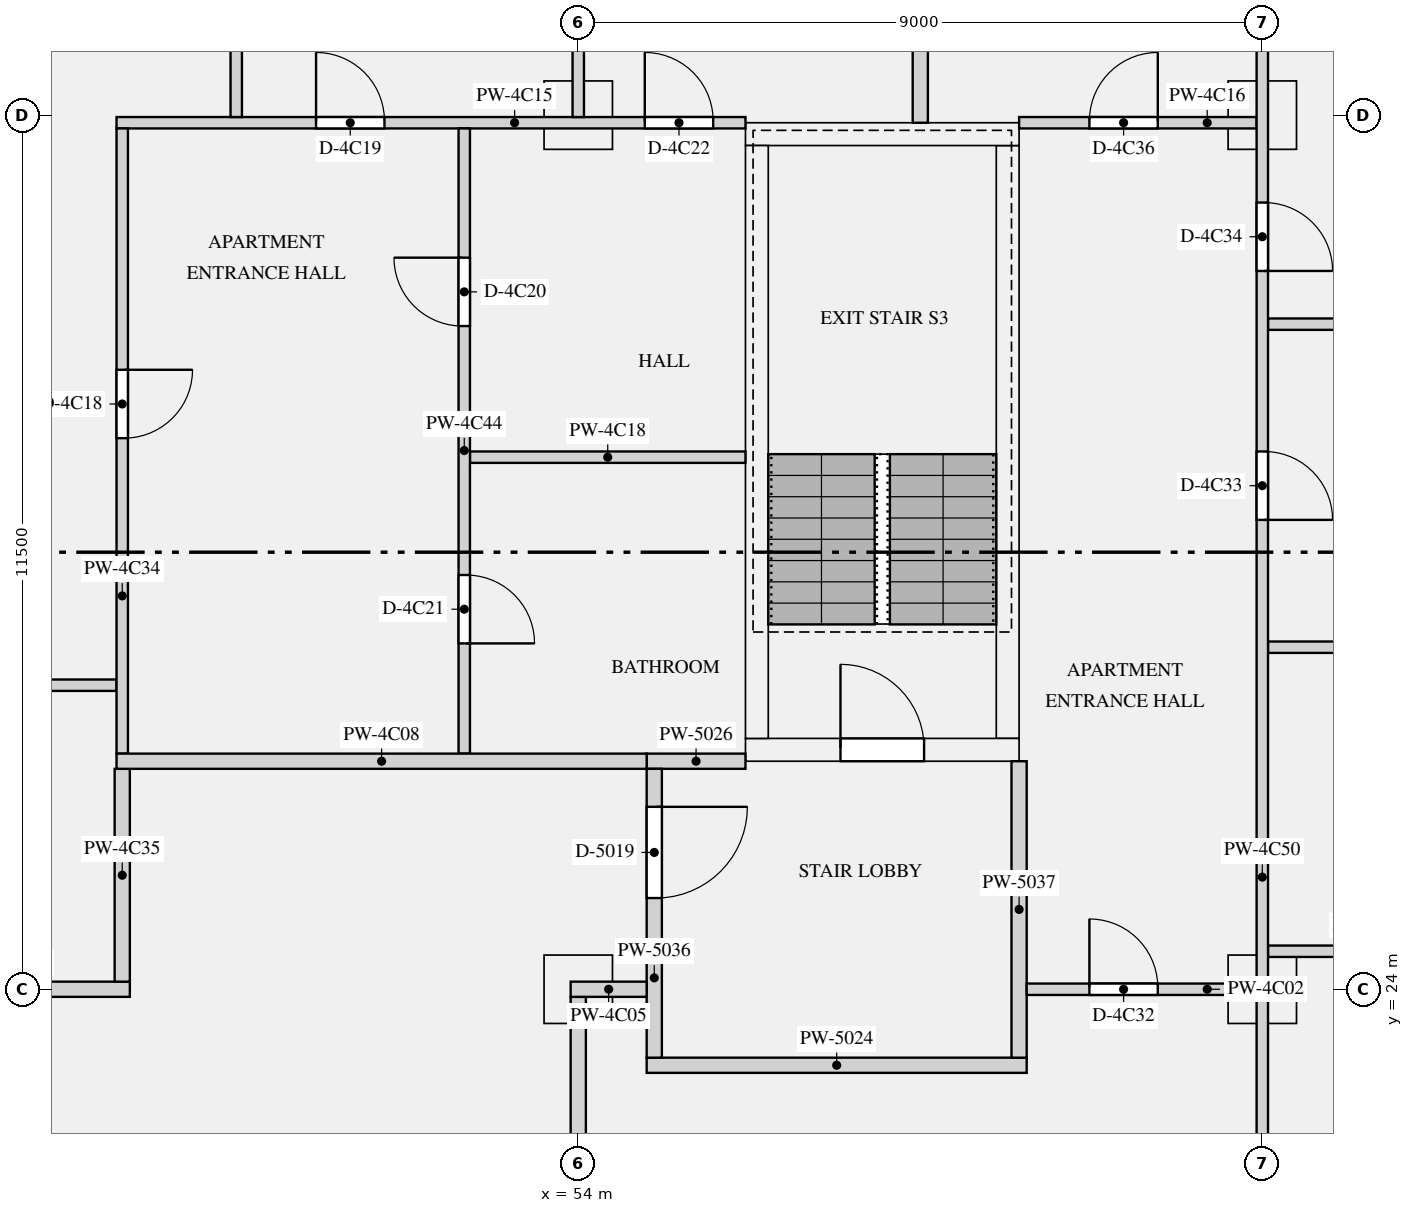
"""IFC4 building model, lengths in metres.
Left out: names, types, materials, properties, quantities, classifications, styles, units other than length and angle.
Written with IfcOpenShell. Run it as: python <this file> out.ifc"""

import sys

from ifc_helpers import new_model, si_unit, direction, frame, frame_2d, origin, origin_2d, place, context, subcontext, project, spatial, rectangle, extrude, element, fill, save


model = new_model("IFC4")
c1 = context("Model", 3, precision=1e-05, world=origin(), true_north=direction((0.0, 1.0)))
c2 = subcontext(c1, "Body", "Model", "MODEL_VIEW")
j1 = project(units=[si_unit("LENGTHUNIT", "METRE"), si_unit("PLANEANGLEUNIT", "RADIAN")], contexts=[c1])
p1 = place(None, origin())
s1 = spatial("IfcSite", under=j1, at=p1, CompositionType="ELEMENT")
p2 = place(p1, origin())
s2 = spatial("IfcBuilding", under=s1, at=p2, CompositionType="ELEMENT")
p3 = place(p2, frame((0.0, 0.0, 216.9)))
s3 = spatial("IfcBuildingStorey", under=s2, at=p3, CompositionType="ELEMENT", Elevation=216.9)
for number, where, z_axis, x_axis in (
    (1, (54.0, 24.0, 0.0), (0.0, 0.0, 1.0), (1.0, 0.0, 0.0)),
    (2, (63.0, 24.0, 0.0), (0.0, 0.0, 1.0), (1.0, 0.0, 0.0)),
    (3, (54.0, 35.5, 0.0), (0.0, 0.0, 1.0), (1.0, 0.0, 0.0)),
    (4, (63.0, 35.5, 0.0), (0.0, 0.0, 1.0), (1.0, 0.0, 0.0)),
):
    element("IfcColumn", number, at=place(p3, frame(where, z_axis=z_axis, x_axis=x_axis)), inside=s3, PredefinedType="COLUMN", context=c2, shape_type="SweptSolid", body=[
        extrude(rectangle(XDim=0.9, YDim=0.9, at=origin_2d()), origin(), (0.0, 0.0, 1.0), 3.15),
    ])
p4 = place(p3, frame((56.2, 27.15, 0.0), z_axis=(0.0, 0.0, 1.0), x_axis=(1.0, 0.0, 0.0)))
e5 = element("IfcWall", 5, at=p4, inside=s3, PredefinedType="SHEAR", context=c2, shape_type="SweptSolid", body=[
    extrude(rectangle(XDim=3.6, YDim=0.3, at=frame_2d((1.8, 0.0))), origin(), (0.0, 0.0, 1.0), 3.15),
])
p5 = place(p4, frame((1.25, 0.0, 0.0)))
e6 = element("IfcOpeningElement", 6, at=p5, cuts=e5, PredefinedType="OPENING", context=c2, shape_type="SweptSolid", body=[
    extrude(rectangle(XDim=1.1, YDim=2.1, at=frame_2d((0.55, 1.05))), frame((0.0, 0.16, 0.0), z_axis=(0.0, -1.0, 0.0), x_axis=(1.0, 0.0, 0.0)), (0.0, 0.0, 1.0), 0.32),
])
p6 = place(p3, frame((56.2, 35.25, 0.0), z_axis=(0.0, 0.0, 1.0), x_axis=(1.0, 0.0, 0.0)))
e7 = element("IfcWall", 7, at=p6, inside=s3, PredefinedType="SHEAR", context=c2, shape_type="SweptSolid", body=[
    extrude(rectangle(XDim=3.6, YDim=0.3, at=frame_2d((1.8, 0.0))), origin(), (0.0, 0.0, 1.0), 3.15),
])
for number, where, z_axis, x_axis in (
    (8, (56.35, 27.3, 0.0), (0.0, 0.0, 1.0), (0.0, 1.0, 0.0)),
    (9, (59.65, 27.3, 0.0), (0.0, 0.0, 1.0), (0.0, 1.0, 0.0)),
):
    element("IfcWall", number, at=place(p3, frame(where, z_axis=z_axis, x_axis=x_axis)), inside=s3, PredefinedType="SHEAR", context=c2, shape_type="SweptSolid", body=[
        extrude(rectangle(XDim=7.8, YDim=0.3, at=frame_2d((3.9, 0.0))), origin(), (0.0, 0.0, 1.0), 3.15),
    ])
p7 = place(p3, frame((54.9, 23.0, 0.0), z_axis=(0.0, 0.0, 1.0), x_axis=(1.0, 0.0, 0.0)))
e10 = element("IfcWall", 10, at=p7, inside=s3, PredefinedType="PARTITIONING", context=c2, shape_type="SweptSolid", body=[
    extrude(rectangle(XDim=5.0, YDim=0.2, at=frame_2d((2.5, 0.0))), origin(), (0.0, 0.0, 1.0), 2.83),
])
p8 = place(p3, frame((54.9, 27.0, 0.0), z_axis=(0.0, 0.0, 1.0), x_axis=(1.0, 0.0, 0.0)))
e11 = element("IfcWall", 11, at=p8, inside=s3, PredefinedType="PARTITIONING", context=c2, shape_type="SweptSolid", body=[
    extrude(rectangle(XDim=1.3, YDim=0.2, at=frame_2d((0.65, 0.0))), origin(), (0.0, 0.0, 1.0), 2.83),
])
p9 = place(p3, frame((55.0, 23.1, 0.0), z_axis=(0.0, 0.0, 1.0), x_axis=(0.0, 1.0, 0.0)))
e12 = element("IfcWall", 12, at=p9, inside=s3, PredefinedType="PARTITIONING", context=c2, shape_type="SweptSolid", body=[
    extrude(rectangle(XDim=3.8, YDim=0.2, at=frame_2d((1.9, 0.0))), origin(), (0.0, 0.0, 1.0), 2.83),
])
p10 = place(p9, frame((2.1, 0.0, 0.0)))
e13 = element("IfcOpeningElement", 13, at=p10, cuts=e12, PredefinedType="OPENING", context=c2, shape_type="SweptSolid", body=[
    extrude(rectangle(XDim=1.2, YDim=2.1, at=frame_2d((0.6, 1.05))), frame((0.0, 0.11, 0.0), z_axis=(0.0, -1.0, 0.0), x_axis=(1.0, 0.0, 0.0)), (0.0, 0.0, 1.0), 0.22),
])
p11 = place(p3, frame((59.8, 23.1, 0.0), z_axis=(0.0, 0.0, 1.0), x_axis=(0.0, 1.0, 0.0)))
e14 = element("IfcWall", 14, at=p11, inside=s3, PredefinedType="PARTITIONING", context=c2, shape_type="SweptSolid", body=[
    extrude(rectangle(XDim=3.9, YDim=0.2, at=frame_2d((1.95, 0.0))), origin(), (0.0, 0.0, 1.0), 2.83),
])
p12 = place(p3, frame((59.9, 24.0, 0.0), z_axis=(0.0, 0.0, 1.0), x_axis=(1.0, 0.0, 0.0)))
e15 = element("IfcWall", 15, at=p12, inside=s3, PredefinedType="PARTITIONING", context=c2, shape_type="SweptSolid", body=[
    extrude(rectangle(XDim=3.025, YDim=0.15, at=frame_2d((1.513, 0.0))), origin(), (0.0, 0.0, 1.0), 2.83),
])
p13 = place(p12, frame((0.825, 0.0, 0.0)))
e16 = element("IfcOpeningElement", 16, at=p13, cuts=e15, PredefinedType="OPENING", context=c2, shape_type="SweptSolid", body=[
    extrude(rectangle(XDim=0.9, YDim=2.1, at=frame_2d((0.45, 1.05))), frame((0.0, 0.085, 0.0), z_axis=(0.0, -1.0, 0.0), x_axis=(1.0, 0.0, 0.0)), (0.0, 0.0, 1.0), 0.17),
])
p14 = place(p3, frame((45.0, 24.0, 0.0), z_axis=(0.0, 0.0, 1.0), x_axis=(1.0, 0.0, 0.0)))
e17 = element("IfcWall", 17, at=p14, inside=s3, PredefinedType="PARTITIONING", context=c2, shape_type="SweptSolid", body=[
    extrude(rectangle(XDim=3.1, YDim=0.2, at=frame_2d((1.55, 0.0))), origin(), (0.0, 0.0, 1.0), 2.83),
])
p15 = place(p3, frame((53.9, 24.0, 0.0), z_axis=(0.0, 0.0, 1.0), x_axis=(1.0, 0.0, 0.0)))
e18 = element("IfcWall", 18, at=p15, inside=s3, PredefinedType="PARTITIONING", context=c2, shape_type="SweptSolid", body=[
    extrude(rectangle(XDim=1.0, YDim=0.2, at=frame_2d((0.5, 0.0))), origin(), (0.0, 0.0, 1.0), 2.83),
])
p16 = place(p3, frame((47.925, 27.0, 0.0), z_axis=(0.0, 0.0, 1.0), x_axis=(1.0, 0.0, 0.0)))
e19 = element("IfcWall", 19, at=p16, inside=s3, PredefinedType="PARTITIONING", context=c2, shape_type="SweptSolid", body=[
    extrude(rectangle(XDim=6.975, YDim=0.2, at=frame_2d((3.487, 0.0))), origin(), (0.0, 0.0, 1.0), 2.83),
])
p17 = place(p3, frame((47.925, 35.4, 0.0), z_axis=(0.0, 0.0, 1.0), x_axis=(1.0, 0.0, 0.0)))
e20 = element("IfcWall", 20, at=p17, inside=s3, PredefinedType="PARTITIONING", context=c2, shape_type="SweptSolid", body=[
    extrude(rectangle(XDim=8.275, YDim=0.15, at=frame_2d((4.137, 0.0))), origin(), (0.0, 0.0, 1.0), 2.83),
])
p18 = place(p17, frame((2.625, 0.0, 0.0)))
e21 = element("IfcOpeningElement", 21, at=p18, cuts=e20, PredefinedType="OPENING", context=c2, shape_type="SweptSolid", body=[
    extrude(rectangle(XDim=0.9, YDim=2.1, at=frame_2d((0.45, 1.05))), frame((0.0, 0.085, 0.0), z_axis=(0.0, -1.0, 0.0), x_axis=(1.0, 0.0, 0.0)), (0.0, 0.0, 1.0), 0.17),
])
p19 = place(p17, frame((6.95, 0.0, 0.0)))
e22 = element("IfcOpeningElement", 22, at=p19, cuts=e20, PredefinedType="OPENING", context=c2, shape_type="SweptSolid", body=[
    extrude(rectangle(XDim=0.9, YDim=2.1, at=frame_2d((0.45, 1.05))), frame((0.0, 0.085, 0.0), z_axis=(0.0, -1.0, 0.0), x_axis=(1.0, 0.0, 0.0)), (0.0, 0.0, 1.0), 0.17),
])
p20 = place(p3, frame((59.8, 35.4, 0.0), z_axis=(0.0, 0.0, 1.0), x_axis=(1.0, 0.0, 0.0)))
e23 = element("IfcWall", 23, at=p20, inside=s3, PredefinedType="PARTITIONING", context=c2, shape_type="SweptSolid", body=[
    extrude(rectangle(XDim=3.125, YDim=0.15, at=frame_2d((1.562, 0.0))), origin(), (0.0, 0.0, 1.0), 2.83),
])
p21 = place(p20, frame((0.925, 0.0, 0.0)))
e24 = element("IfcOpeningElement", 24, at=p21, cuts=e23, PredefinedType="OPENING", context=c2, shape_type="SweptSolid", body=[
    extrude(rectangle(XDim=0.9, YDim=2.1, at=frame_2d((0.45, 1.05))), frame((0.0, 0.085, 0.0), z_axis=(0.0, -1.0, 0.0), x_axis=(1.0, 0.0, 0.0)), (0.0, 0.0, 1.0), 0.17),
])
p22 = place(p3, frame((52.575, 31.0, 0.0), z_axis=(0.0, 0.0, 1.0), x_axis=(1.0, 0.0, 0.0)))
e25 = element("IfcWall", 25, at=p22, inside=s3, PredefinedType="PARTITIONING", context=c2, shape_type="SweptSolid", body=[
    extrude(rectangle(XDim=3.625, YDim=0.15, at=frame_2d((1.812, 0.0))), origin(), (0.0, 0.0, 1.0), 2.83),
])
p23 = place(p3, frame((63.075, 32.75, 0.0), z_axis=(0.0, 0.0, 1.0), x_axis=(1.0, 0.0, 0.0)))
e26 = element("IfcWall", 26, at=p23, inside=s3, PredefinedType="PARTITIONING", context=c2, shape_type="SweptSolid", body=[
    extrude(rectangle(XDim=8.275, YDim=0.15, at=frame_2d((4.138, 0.0))), origin(), (0.0, 0.0, 1.0), 2.83),
])
p24 = place(p3, frame((45.0, 28.0, 0.0), z_axis=(0.0, 0.0, 1.0), x_axis=(1.0, 0.0, 0.0)))
e27 = element("IfcWall", 27, at=p24, inside=s3, PredefinedType="PARTITIONING", context=c2, shape_type="SweptSolid", body=[
    extrude(rectangle(XDim=2.925, YDim=0.15, at=frame_2d((1.462, 0.0))), origin(), (0.0, 0.0, 1.0), 2.83),
])
p25 = place(p24, frame((1.05, 0.0, 0.0)))
e28 = element("IfcOpeningElement", 28, at=p25, cuts=e27, PredefinedType="OPENING", context=c2, shape_type="SweptSolid", body=[
    extrude(rectangle(XDim=0.9, YDim=2.1, at=frame_2d((0.45, 1.05))), frame((0.0, 0.085, 0.0), z_axis=(0.0, -1.0, 0.0), x_axis=(1.0, 0.0, 0.0)), (0.0, 0.0, 1.0), 0.17),
])
p26 = place(p3, frame((63.075, 24.5, 0.0), z_axis=(0.0, 0.0, 1.0), x_axis=(1.0, 0.0, 0.0)))
e29 = element("IfcWall", 29, at=p26, inside=s3, PredefinedType="PARTITIONING", context=c2, shape_type="SweptSolid", body=[
    extrude(rectangle(XDim=5.775, YDim=0.15, at=frame_2d((2.888, 0.0))), origin(), (0.0, 0.0, 1.0), 2.83),
])
p27 = place(p26, frame((2.7, 0.0, 0.0)))
e30 = element("IfcOpeningElement", 30, at=p27, cuts=e29, PredefinedType="OPENING", context=c2, shape_type="SweptSolid", body=[
    extrude(rectangle(XDim=0.9, YDim=2.1, at=frame_2d((0.45, 1.05))), frame((0.0, 0.085, 0.0), z_axis=(0.0, -1.0, 0.0), x_axis=(1.0, 0.0, 0.0)), (0.0, 0.0, 1.0), 0.17),
])
p28 = place(p3, frame((63.075, 28.5, 0.0), z_axis=(0.0, 0.0, 1.0), x_axis=(1.0, 0.0, 0.0)))
e31 = element("IfcWall", 31, at=p28, inside=s3, PredefinedType="PARTITIONING", context=c2, shape_type="SweptSolid", body=[
    extrude(rectangle(XDim=5.775, YDim=0.15, at=frame_2d((2.888, 0.0))), origin(), (0.0, 0.0, 1.0), 2.83),
])
p29 = place(p3, frame((54.0, 35.475, 0.0), z_axis=(0.0, 0.0, 1.0), x_axis=(0.0, 1.0, 0.0)))
e32 = element("IfcWall", 32, at=p29, inside=s3, PredefinedType="PARTITIONING", context=c2, shape_type="SweptSolid", body=[
    extrude(rectangle(XDim=5.375, YDim=0.15, at=frame_2d((2.688, 0.0))), origin(), (0.0, 0.0, 1.0), 2.83),
])
p30 = place(p3, frame((54.0, 16.1, 0.0), z_axis=(0.0, 0.0, 1.0), x_axis=(0.0, 1.0, 0.0)))
e33 = element("IfcWall", 33, at=p30, inside=s3, PredefinedType="PARTITIONING", context=c2, shape_type="SweptSolid", body=[
    extrude(rectangle(XDim=7.8, YDim=0.2, at=frame_2d((3.9, 0.0))), origin(), (0.0, 0.0, 1.0), 2.83),
])
p31 = place(p30, frame((1.85, 0.0, 0.0)))
e34 = element("IfcOpeningElement", 34, at=p31, cuts=e33, PredefinedType="OPENING", context=c2, shape_type="SweptSolid", body=[
    extrude(rectangle(XDim=1.1, YDim=2.1, at=frame_2d((0.55, 1.05))), frame((0.0, 0.11, 0.0), z_axis=(0.0, -1.0, 0.0), x_axis=(1.0, 0.0, 0.0)), (0.0, 0.0, 1.0), 0.22),
])
p32 = place(p3, frame((48.0, 27.1, 0.0), z_axis=(0.0, 0.0, 1.0), x_axis=(0.0, 1.0, 0.0)))
e35 = element("IfcWall", 35, at=p32, inside=s3, PredefinedType="PARTITIONING", context=c2, shape_type="SweptSolid", body=[
    extrude(rectangle(XDim=8.225, YDim=0.15, at=frame_2d((4.112, 0.0))), origin(), (0.0, 0.0, 1.0), 2.83),
])
p33 = place(p32, frame((4.15, 0.0, 0.0)))
e36 = element("IfcOpeningElement", 36, at=p33, cuts=e35, PredefinedType="OPENING", context=c2, shape_type="SweptSolid", body=[
    extrude(rectangle(XDim=0.9, YDim=2.1, at=frame_2d((0.45, 1.05))), frame((0.0, 0.085, 0.0), z_axis=(0.0, -1.0, 0.0), x_axis=(1.0, 0.0, 0.0)), (0.0, 0.0, 1.0), 0.17),
])
p34 = place(p3, frame((48.0, 24.1, 0.0), z_axis=(0.0, 0.0, 1.0), x_axis=(0.0, 1.0, 0.0)))
e37 = element("IfcWall", 37, at=p34, inside=s3, PredefinedType="PARTITIONING", context=c2, shape_type="SweptSolid", body=[
    extrude(rectangle(XDim=2.8, YDim=0.2, at=frame_2d((1.4, 0.0))), origin(), (0.0, 0.0, 1.0), 2.83),
])
p35 = place(p3, frame((49.5, 35.475, 0.0), z_axis=(0.0, 0.0, 1.0), x_axis=(0.0, 1.0, 0.0)))
e38 = element("IfcWall", 38, at=p35, inside=s3, PredefinedType="PARTITIONING", context=c2, shape_type="SweptSolid", body=[
    extrude(rectangle(XDim=5.375, YDim=0.15, at=frame_2d((2.688, 0.0))), origin(), (0.0, 0.0, 1.0), 2.83),
])
p36 = place(p3, frame((52.5, 27.1, 0.0), z_axis=(0.0, 0.0, 1.0), x_axis=(0.0, 1.0, 0.0)))
e39 = element("IfcWall", 39, at=p36, inside=s3, PredefinedType="PARTITIONING", context=c2, shape_type="SweptSolid", body=[
    extrude(rectangle(XDim=8.225, YDim=0.15, at=frame_2d((4.112, 0.0))), origin(), (0.0, 0.0, 1.0), 2.83),
])
p37 = place(p36, frame((5.625, 0.0, 0.0)))
e40 = element("IfcOpeningElement", 40, at=p37, cuts=e39, PredefinedType="OPENING", context=c2, shape_type="SweptSolid", body=[
    extrude(rectangle(XDim=0.9, YDim=2.1, at=frame_2d((0.45, 1.05))), frame((0.0, 0.085, 0.0), z_axis=(0.0, -1.0, 0.0), x_axis=(1.0, 0.0, 0.0)), (0.0, 0.0, 1.0), 0.17),
])
p38 = place(p36, frame((1.45, 0.0, 0.0)))
e41 = element("IfcOpeningElement", 41, at=p38, cuts=e39, PredefinedType="OPENING", context=c2, shape_type="SweptSolid", body=[
    extrude(rectangle(XDim=0.9, YDim=2.1, at=frame_2d((0.45, 1.05))), frame((0.0, 0.085, 0.0), z_axis=(0.0, -1.0, 0.0), x_axis=(1.0, 0.0, 0.0)), (0.0, 0.0, 1.0), 0.17),
])
p39 = place(p3, frame((58.5, 35.4, 0.0), z_axis=(0.0, 0.0, 1.0), x_axis=(0.0, 1.0, 0.0)))
e42 = element("IfcWall", 42, at=p39, inside=s3, PredefinedType="PARTITIONING", context=c2, shape_type="SweptSolid", body=[
    extrude(rectangle(XDim=5.45, YDim=0.2, at=frame_2d((2.725, 0.0))), origin(), (0.0, 0.0, 1.0), 2.83),
])
p40 = place(p3, frame((63.0, 16.575, 0.0), z_axis=(0.0, 0.0, 1.0), x_axis=(0.0, 1.0, 0.0)))
e43 = element("IfcWall", 43, at=p40, inside=s3, PredefinedType="PARTITIONING", context=c2, shape_type="SweptSolid", body=[
    extrude(rectangle(XDim=24.275, YDim=0.15, at=frame_2d((12.138, 0.0))), origin(), (0.0, 0.0, 1.0), 2.83),
])
p41 = place(p40, frame((2.7, 0.0, 0.0)))
e44 = element("IfcOpeningElement", 44, at=p41, cuts=e43, PredefinedType="OPENING", context=c2, shape_type="SweptSolid", body=[
    extrude(rectangle(XDim=1.5, YDim=2.1, at=frame_2d((0.75, 1.05))), frame((0.0, 0.085, 0.0), z_axis=(0.0, -1.0, 0.0), x_axis=(1.0, 0.0, 0.0)), (0.0, 0.0, 1.0), 0.17),
])
p42 = place(p40, frame((13.6, 0.0, 0.0)))
e45 = element("IfcOpeningElement", 45, at=p42, cuts=e43, PredefinedType="OPENING", context=c2, shape_type="SweptSolid", body=[
    extrude(rectangle(XDim=0.9, YDim=2.1, at=frame_2d((0.45, 1.05))), frame((0.0, 0.085, 0.0), z_axis=(0.0, -1.0, 0.0), x_axis=(1.0, 0.0, 0.0)), (0.0, 0.0, 1.0), 0.17),
])
p43 = place(p40, frame((16.875, 0.0, 0.0)))
e46 = element("IfcOpeningElement", 46, at=p43, cuts=e43, PredefinedType="OPENING", context=c2, shape_type="SweptSolid", body=[
    extrude(rectangle(XDim=0.9, YDim=2.1, at=frame_2d((0.45, 1.05))), frame((0.0, 0.085, 0.0), z_axis=(0.0, -1.0, 0.0), x_axis=(1.0, 0.0, 0.0)), (0.0, 0.0, 1.0), 0.17),
])
p44 = place(p5, origin())
e47 = element("IfcDoor", 47, at=p44, inside=s3, OperationType="SINGLE_SWING_LEFT", PredefinedType="DOOR", context=c2, shape_type="SweptSolid", body=[
    extrude(rectangle(XDim=1.1, YDim=2.1, at=frame_2d((0.55, 1.05))), frame((0.0, 0.025, 0.0), z_axis=(0.0, -1.0, 0.0), x_axis=(1.0, 0.0, 0.0)), (0.0, 0.0, 1.0), 0.05),
])
fill(e6, e47)
p45 = place(p10, frame((1.2, 0.0, 0.0), z_axis=(0.0, 0.0, 1.0), x_axis=(-1.0, 0.0, 0.0)))
e48 = element("IfcDoor", 48, at=p45, inside=s3, OperationType="SINGLE_SWING_LEFT", PredefinedType="DOOR", context=c2, shape_type="SweptSolid", body=[
    extrude(rectangle(XDim=1.2, YDim=2.1, at=frame_2d((0.6, 1.05))), frame((0.0, 0.025, 0.0), z_axis=(0.0, -1.0, 0.0), x_axis=(1.0, 0.0, 0.0)), (0.0, 0.0, 1.0), 0.05),
])
fill(e13, e48)
p46 = place(p33, frame((0.9, 0.0, 0.0), z_axis=(0.0, 0.0, 1.0), x_axis=(-1.0, 0.0, 0.0)))
e49 = element("IfcDoor", 49, at=p46, inside=s3, OperationType="SINGLE_SWING_LEFT", PredefinedType="DOOR", context=c2, shape_type="SweptSolid", body=[
    extrude(rectangle(XDim=0.9, YDim=2.1, at=frame_2d((0.45, 1.05))), frame((0.0, 0.025, 0.0), z_axis=(0.0, -1.0, 0.0), x_axis=(1.0, 0.0, 0.0)), (0.0, 0.0, 1.0), 0.05),
])
fill(e36, e49)
p47 = place(p18, origin())
e50 = element("IfcDoor", 50, at=p47, inside=s3, OperationType="SINGLE_SWING_LEFT", PredefinedType="DOOR", context=c2, shape_type="SweptSolid", body=[
    extrude(rectangle(XDim=0.9, YDim=2.1, at=frame_2d((0.45, 1.05))), frame((0.0, 0.025, 0.0), z_axis=(0.0, -1.0, 0.0), x_axis=(1.0, 0.0, 0.0)), (0.0, 0.0, 1.0), 0.05),
])
fill(e21, e50)
p48 = place(p37, origin())
e51 = element("IfcDoor", 51, at=p48, inside=s3, OperationType="SINGLE_SWING_RIGHT", PredefinedType="DOOR", context=c2, shape_type="SweptSolid", body=[
    extrude(rectangle(XDim=0.9, YDim=2.1, at=frame_2d((0.45, 1.05))), frame((0.0, 0.025, 0.0), z_axis=(0.0, -1.0, 0.0), x_axis=(1.0, 0.0, 0.0)), (0.0, 0.0, 1.0), 0.05),
])
fill(e40, e51)
p49 = place(p38, frame((0.9, 0.0, 0.0), z_axis=(0.0, 0.0, 1.0), x_axis=(-1.0, 0.0, 0.0)))
e52 = element("IfcDoor", 52, at=p49, inside=s3, OperationType="SINGLE_SWING_RIGHT", PredefinedType="DOOR", context=c2, shape_type="SweptSolid", body=[
    extrude(rectangle(XDim=0.9, YDim=2.1, at=frame_2d((0.45, 1.05))), frame((0.0, 0.025, 0.0), z_axis=(0.0, -1.0, 0.0), x_axis=(1.0, 0.0, 0.0)), (0.0, 0.0, 1.0), 0.05),
])
fill(e41, e52)
p50 = place(p19, origin())
e53 = element("IfcDoor", 53, at=p50, inside=s3, OperationType="SINGLE_SWING_LEFT", PredefinedType="DOOR", context=c2, shape_type="SweptSolid", body=[
    extrude(rectangle(XDim=0.9, YDim=2.1, at=frame_2d((0.45, 1.05))), frame((0.0, 0.025, 0.0), z_axis=(0.0, -1.0, 0.0), x_axis=(1.0, 0.0, 0.0)), (0.0, 0.0, 1.0), 0.05),
])
fill(e22, e53)
p51 = place(p13, origin())
e54 = element("IfcDoor", 54, at=p51, inside=s3, OperationType="SINGLE_SWING_LEFT", PredefinedType="DOOR", context=c2, shape_type="SweptSolid", body=[
    extrude(rectangle(XDim=0.9, YDim=2.1, at=frame_2d((0.45, 1.05))), frame((0.0, 0.025, 0.0), z_axis=(0.0, -1.0, 0.0), x_axis=(1.0, 0.0, 0.0)), (0.0, 0.0, 1.0), 0.05),
])
fill(e16, e54)
p52 = place(p42, frame((0.9, 0.0, 0.0), z_axis=(0.0, 0.0, 1.0), x_axis=(-1.0, 0.0, 0.0)))
e55 = element("IfcDoor", 55, at=p52, inside=s3, OperationType="SINGLE_SWING_RIGHT", PredefinedType="DOOR", context=c2, shape_type="SweptSolid", body=[
    extrude(rectangle(XDim=0.9, YDim=2.1, at=frame_2d((0.45, 1.05))), frame((0.0, 0.025, 0.0), z_axis=(0.0, -1.0, 0.0), x_axis=(1.0, 0.0, 0.0)), (0.0, 0.0, 1.0), 0.05),
])
fill(e45, e55)
p53 = place(p43, frame((0.9, 0.0, 0.0), z_axis=(0.0, 0.0, 1.0), x_axis=(-1.0, 0.0, 0.0)))
e56 = element("IfcDoor", 56, at=p53, inside=s3, OperationType="SINGLE_SWING_RIGHT", PredefinedType="DOOR", context=c2, shape_type="SweptSolid", body=[
    extrude(rectangle(XDim=0.9, YDim=2.1, at=frame_2d((0.45, 1.05))), frame((0.0, 0.025, 0.0), z_axis=(0.0, -1.0, 0.0), x_axis=(1.0, 0.0, 0.0)), (0.0, 0.0, 1.0), 0.05),
])
fill(e46, e56)
p54 = place(p21, origin())
e57 = element("IfcDoor", 57, at=p54, inside=s3, OperationType="SINGLE_SWING_RIGHT", PredefinedType="DOOR", context=c2, shape_type="SweptSolid", body=[
    extrude(rectangle(XDim=0.9, YDim=2.1, at=frame_2d((0.45, 1.05))), frame((0.0, 0.025, 0.0), z_axis=(0.0, -1.0, 0.0), x_axis=(1.0, 0.0, 0.0)), (0.0, 0.0, 1.0), 0.05),
])
fill(e24, e57)
save(model, sys.argv[1])
